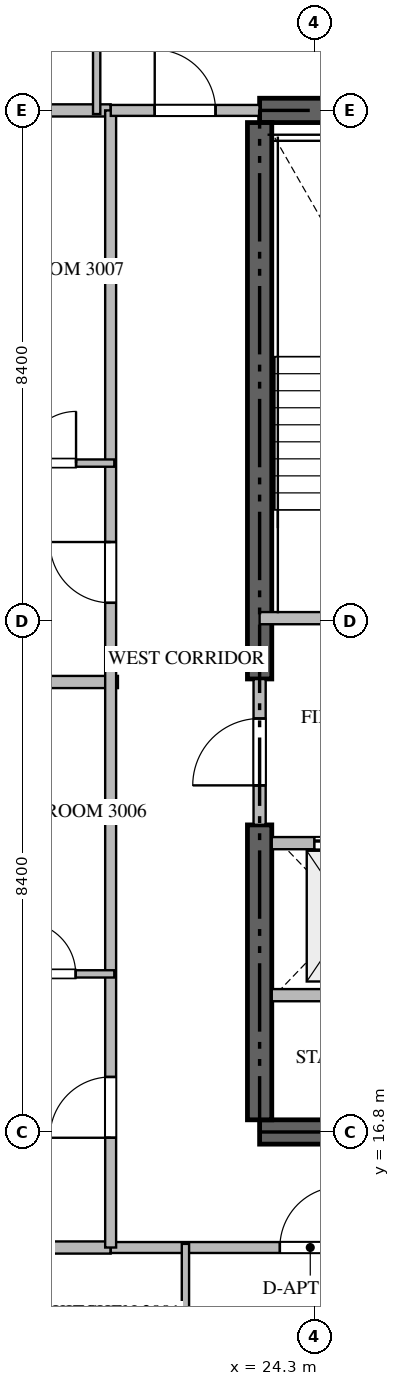
"""IFC4 building model, lengths in metres.
Left out: names, types, materials, properties, quantities, classifications, styles, units other than length and angle.
Written with IfcOpenShell. Run it as: python <this file> out.ifc"""

import sys

from ifc_helpers import new_model, si_unit, direction, frame, frame_2d, origin, place, context, subcontext, project, spatial, rectangle, extrude, source, transform, mapped, element, fill, save


model = new_model("IFC4")
c1 = context("Model", 3, precision=1e-05, world=origin(), true_north=direction((0.0, 1.0)))
c2 = subcontext(c1, "Body", "Model", "MODEL_VIEW")
j1 = project(units=[si_unit("LENGTHUNIT", "METRE"), si_unit("PLANEANGLEUNIT", "RADIAN")], contexts=[c1])
p1 = place(None, origin())
s1 = spatial("IfcSite", under=j1, at=p1, CompositionType="ELEMENT")
p2 = place(p1, origin())
s2 = spatial("IfcBuilding", under=s1, at=p2, CompositionType="ELEMENT")
p3 = place(p2, frame((0.0, 0.0, 123.9)))
s3 = spatial("IfcBuildingStorey", under=s2, at=p3, CompositionType="ELEMENT", Elevation=123.9)
for number, where, z_axis, x_axis in (
    (1, (23.4, 16.8, -0.26), (0.0, 0.0, 1.0), (1.0, 0.0, 0.0)),
    (2, (41.4, 33.6, -0.26), (0.0, 0.0, 1.0), (-1.0, 0.0, 0.0)),
):
    element("IfcWall", number, at=place(p3, frame(where, z_axis=z_axis, x_axis=x_axis)), inside=s3, PredefinedType="SHEAR", context=c2, shape_type="SweptSolid", body=[
        extrude(rectangle(XDim=18.0, YDim=0.4, at=frame_2d((9.0, 0.0))), origin(), (0.0, 0.0, 1.0), 3.748),
    ])
p4 = place(p3, frame((23.4, 17.0, -0.26), z_axis=(0.0, 0.0, 1.0), x_axis=(0.0, 1.0, 0.0)))
e3 = element("IfcWall", 3, at=p4, inside=s3, PredefinedType="SHEAR", context=c2, shape_type="SweptSolid", body=[
    extrude(rectangle(XDim=4.85, YDim=0.4, at=frame_2d((2.425, 0.0))), origin(), (0.0, 0.0, 1.0), 3.748),
])
p5 = place(p3, frame((23.4, 24.25, -0.26), z_axis=(0.0, 0.0, 1.0), x_axis=(0.0, 1.0, 0.0)))
e4 = element("IfcWall", 4, at=p5, inside=s3, PredefinedType="SHEAR", context=c2, shape_type="SweptSolid", body=[
    extrude(rectangle(XDim=9.15, YDim=0.4, at=frame_2d((4.575, 0.0))), origin(), (0.0, 0.0, 1.0), 3.748),
])
p6 = place(p3, frame((23.4, 25.25, 0.0), z_axis=(0.0, 0.0, 1.0), x_axis=(1.0, 0.0, 0.0)))
e5 = element("IfcWall", 5, at=p6, inside=s3, PredefinedType="STANDARD", context=c2, shape_type="SweptSolid", body=[
    extrude(rectangle(XDim=4.45, YDim=0.2, at=frame_2d((2.225, 0.0))), origin(), (0.0, 0.0, 1.0), 3.49),
])
p7 = place(p6, frame((1.65, 0.0, 0.0)))
e6 = element("IfcOpeningElement", 6, at=p7, cuts=e5, PredefinedType="OPENING", context=c2, shape_type="SweptSolid", body=[
    extrude(rectangle(XDim=1.1, YDim=2.15, at=frame_2d((0.55, 1.075))), frame((0.0, 0.11, 0.0), z_axis=(0.0, -1.0, 0.0), x_axis=(1.0, 0.0, 0.0)), (0.0, 0.0, 1.0), 0.22),
])
p8 = place(p3, frame((23.6, 21.55, 0.0), z_axis=(0.0, 0.0, 1.0), x_axis=(1.0, 0.0, 0.0)))
e7 = element("IfcWall", 7, at=p8, inside=s3, PredefinedType="STANDARD", context=c2, shape_type="SweptSolid", body=[
    extrude(rectangle(XDim=2.45, YDim=0.2, at=frame_2d((1.225, 0.0))), origin(), (0.0, 0.0, 1.0), 3.49),
])
p9 = place(p8, frame((0.7, 0.0, 0.0)))
e8 = element("IfcOpeningElement", 8, at=p9, cuts=e7, PredefinedType="OPENING", context=c2, shape_type="SweptSolid", body=[
    extrude(rectangle(XDim=1.2, YDim=2.2, at=frame_2d((0.6, 1.1))), frame((0.0, 0.11, 0.0), z_axis=(0.0, -1.0, 0.0), x_axis=(1.0, 0.0, 0.0)), (0.0, 0.0, 1.0), 0.22),
])
p10 = place(p3, frame((23.6, 19.05, 0.0), z_axis=(0.0, 0.0, 1.0), x_axis=(1.0, 0.0, 0.0)))
e9 = element("IfcWall", 9, at=p10, inside=s3, PredefinedType="STANDARD", context=c2, shape_type="SweptSolid", body=[
    extrude(rectangle(XDim=2.45, YDim=0.2, at=frame_2d((1.225, 0.0))), origin(), (0.0, 0.0, 1.0), 3.49),
])
p11 = place(p3, frame((23.4, 21.852, 0.0), z_axis=(0.0, 0.0, 1.0), x_axis=(0.0, 1.0, 0.0)))
e10 = element("IfcWall", 10, at=p11, inside=s3, PredefinedType="STANDARD", context=c2, shape_type="SweptSolid", body=[
    extrude(rectangle(XDim=2.396, YDim=0.2, at=frame_2d((1.198, 0.0))), origin(), (0.0, 0.0, 1.0), 3.49),
])
p12 = place(p11, frame((0.648, 0.0, 0.0)))
e11 = element("IfcOpeningElement", 11, at=p12, cuts=e10, PredefinedType="OPENING", context=c2, shape_type="SweptSolid", body=[
    extrude(rectangle(XDim=1.1, YDim=2.15, at=frame_2d((0.55, 1.075))), frame((0.0, 0.11, 0.0), z_axis=(0.0, -1.0, 0.0), x_axis=(1.0, 0.0, 0.0)), (0.0, 0.0, 1.0), 0.22),
])
p13 = place(p3, frame((7.882, 24.2, 0.0), z_axis=(0.0, 0.0, 1.0), x_axis=(1.0, 0.0, 0.0)))
e12 = element("IfcWall", 12, at=p13, inside=s3, PredefinedType="PARTITIONING", context=c2, shape_type="SweptSolid", body=[
    extrude(rectangle(XDim=13.188, YDim=0.2, at=frame_2d((6.594, 0.0))), origin(), (0.0, 0.0, 1.0), 3.49),
])
for number, where, z_axis, x_axis in (
    (13, (7.882, 14.9, 0.0), (0.0, 0.0, 1.0), (1.0, 0.0, 0.0)),
    (14, (7.882, 33.6, 0.0), (0.0, 0.0, 1.0), (1.0, 0.0, 0.0)),
):
    element("IfcWall", number, at=place(p3, frame(where, z_axis=z_axis, x_axis=x_axis)), inside=s3, PredefinedType="PARTITIONING", context=c2, shape_type="SweptSolid", body=[
        extrude(rectangle(XDim=13.068, YDim=0.2, at=frame_2d((6.534, 0.0))), origin(), (0.0, 0.0, 1.0), 3.49),
    ])
p14 = place(p3, frame((20.952, 14.9, 0.0), z_axis=(0.0, 0.0, 1.0), x_axis=(1.0, 0.0, 0.0)))
e15 = element("IfcWall", 15, at=p14, inside=s3, PredefinedType="PARTITIONING", context=c2, shape_type="SweptSolid", body=[
    extrude(rectangle(XDim=22.896, YDim=0.18, at=frame_2d((11.448, 0.0))), origin(), (0.0, 0.0, 1.0), 3.49),
])
p15 = place(p14, frame((2.781, 0.0, 0.0)))
e16 = element("IfcOpeningElement", 16, at=p15, cuts=e15, PredefinedType="OPENING", context=c2, shape_type="SweptSolid", body=[
    extrude(rectangle(XDim=1.0, YDim=2.15, at=frame_2d((0.5, 1.075))), frame((0.0, 0.1, 0.0), z_axis=(0.0, -1.0, 0.0), x_axis=(1.0, 0.0, 0.0)), (0.0, 0.0, 1.0), 0.2),
])
p16 = place(p14, frame((7.16, 0.0, 0.0)))
e17 = element("IfcOpeningElement", 17, at=p16, cuts=e15, PredefinedType="OPENING", context=c2, shape_type="SweptSolid", body=[
    extrude(rectangle(XDim=1.0, YDim=2.15, at=frame_2d((0.5, 1.075))), frame((0.0, 0.1, 0.0), z_axis=(0.0, -1.0, 0.0), x_axis=(1.0, 0.0, 0.0)), (0.0, 0.0, 1.0), 0.2),
])
p17 = place(p14, frame((19.115, 0.0, 0.0)))
e18 = element("IfcOpeningElement", 18, at=p17, cuts=e15, PredefinedType="OPENING", context=c2, shape_type="SweptSolid", body=[
    extrude(rectangle(XDim=1.0, YDim=2.15, at=frame_2d((0.5, 1.075))), frame((0.0, 0.1, 0.0), z_axis=(0.0, -1.0, 0.0), x_axis=(1.0, 0.0, 0.0)), (0.0, 0.0, 1.0), 0.2),
])
p18 = place(p3, frame((20.95, 14.9, 0.0), z_axis=(0.0, 0.0, 1.0), x_axis=(0.0, 1.0, 0.0)))
e19 = element("IfcWall", 19, at=p18, inside=s3, PredefinedType="PARTITIONING", context=c2, shape_type="SweptSolid", body=[
    extrude(rectangle(XDim=18.7, YDim=0.18, at=frame_2d((9.35, 0.0))), origin(), (0.0, 0.0, 1.0), 3.49),
])
p19 = place(p18, frame((1.805, 0.0, 0.0)))
e20 = element("IfcOpeningElement", 20, at=p19, cuts=e19, PredefinedType="OPENING", context=c2, shape_type="SweptSolid", body=[
    extrude(rectangle(XDim=1.0, YDim=2.15, at=frame_2d((0.5, 1.075))), frame((0.0, 0.1, 0.0), z_axis=(0.0, -1.0, 0.0), x_axis=(1.0, 0.0, 0.0)), (0.0, 0.0, 1.0), 0.2),
])
p20 = place(p18, frame((10.602, 0.0, 0.0)))
e21 = element("IfcOpeningElement", 21, at=p20, cuts=e19, PredefinedType="OPENING", context=c2, shape_type="SweptSolid", body=[
    extrude(rectangle(XDim=1.0, YDim=2.15, at=frame_2d((0.5, 1.075))), frame((0.0, 0.1, 0.0), z_axis=(0.0, -1.0, 0.0), x_axis=(1.0, 0.0, 0.0)), (0.0, 0.0, 1.0), 0.2),
])
p21 = place(p3, frame((20.952, 33.6, 0.0), z_axis=(0.0, 0.0, 1.0), x_axis=(1.0, 0.0, 0.0)))
e22 = element("IfcWall", 22, at=p21, inside=s3, PredefinedType="PARTITIONING", context=c2, shape_type="SweptSolid", body=[
    extrude(rectangle(XDim=2.446, YDim=0.18, at=frame_2d((1.223, 0.0))), origin(), (0.0, 0.0, 1.0), 3.49),
])
p22 = place(p21, frame((0.723, 0.0, 0.0)))
e23 = element("IfcOpeningElement", 23, at=p22, cuts=e22, PredefinedType="OPENING", context=c2, shape_type="SweptSolid", body=[
    extrude(rectangle(XDim=1.0, YDim=2.15, at=frame_2d((0.5, 1.075))), frame((0.0, 0.1, 0.0), z_axis=(0.0, -1.0, 0.0), x_axis=(1.0, 0.0, 0.0)), (0.0, 0.0, 1.0), 0.2),
])
for number, where, z_axis, x_axis in (
    (24, (22.18, 12.15, 0.0), (0.0, 0.0, 1.0), (0.0, 1.0, 0.0)),
    (25, (20.72, 36.35, 0.0), (0.0, 0.0, 1.0), (0.0, -1.0, 0.0)),
):
    element("IfcWall", number, at=place(p3, frame(where, z_axis=z_axis, x_axis=x_axis)), inside=s3, PredefinedType="PARTITIONING", context=c2, shape_type="SweptSolid", body=[
        extrude(rectangle(XDim=2.81, YDim=0.12, at=frame_2d((1.405, 0.0))), origin(), (0.0, 0.0, 1.0), 3.49),
    ])
p23 = place(p3, frame((18.889, 19.4, 0.0), z_axis=(0.0, 0.0, 1.0), x_axis=(1.0, 0.0, 0.0)))
e26 = element("IfcWall", 26, at=p23, inside=s3, PredefinedType="PARTITIONING", context=c2, shape_type="SweptSolid", body=[
    extrude(rectangle(XDim=2.121, YDim=0.12, at=frame_2d((1.061, 0.0))), origin(), (0.0, 0.0, 1.0), 3.49),
])
p24 = place(p23, frame((0.636, 0.0, 0.0)))
e27 = element("IfcOpeningElement", 27, at=p24, cuts=e26, PredefinedType="OPENING", context=c2, shape_type="SweptSolid", body=[
    extrude(rectangle(XDim=0.85, YDim=2.1, at=frame_2d((0.425, 1.05))), frame((0.0, 0.07, 0.0), z_axis=(0.0, -1.0, 0.0), x_axis=(1.0, 0.0, 0.0)), (0.0, 0.0, 1.0), 0.14),
])
p25 = place(p3, frame((18.902, 27.8, 0.0), z_axis=(0.0, 0.0, 1.0), x_axis=(1.0, 0.0, 0.0)))
e28 = element("IfcWall", 28, at=p25, inside=s3, PredefinedType="PARTITIONING", context=c2, shape_type="SweptSolid", body=[
    extrude(rectangle(XDim=2.108, YDim=0.12, at=frame_2d((1.054, 0.0))), origin(), (0.0, 0.0, 1.0), 3.49),
])
p26 = place(p25, frame((0.629, 0.0, 0.0)))
e29 = element("IfcOpeningElement", 29, at=p26, cuts=e28, PredefinedType="OPENING", context=c2, shape_type="SweptSolid", body=[
    extrude(rectangle(XDim=0.85, YDim=2.1, at=frame_2d((0.425, 1.05))), frame((0.0, 0.07, 0.0), z_axis=(0.0, -1.0, 0.0), x_axis=(1.0, 0.0, 0.0)), (0.0, 0.0, 1.0), 0.14),
])
m1 = source(origin(), c2, "Body", "SweptSolid", [
    extrude(rectangle(XDim=1.2, YDim=2.2, at=frame_2d((0.6, 1.1))), frame((0.0, 0.025, 0.0), z_axis=(0.0, -1.0, 0.0), x_axis=(1.0, 0.0, 0.0)), (0.0, 0.0, 1.0), 0.05),
])
p27 = place(p9, origin())
e30 = element("IfcDoor", 30, at=p27, inside=s3, OperationType="DOUBLE_DOOR_SLIDING", PredefinedType="DOOR", context=c2, shape_type="MappedRepresentation", body=[
    mapped(m1, transform((0.0, 0.0, 0.0), scale=1.0)),
])
fill(e8, e30)
m2 = source(origin(), c2, "Body", "SweptSolid", [
    extrude(rectangle(XDim=1.1, YDim=2.15, at=frame_2d((0.55, 1.075))), frame((0.0, 0.025, 0.0), z_axis=(0.0, -1.0, 0.0), x_axis=(1.0, 0.0, 0.0)), (0.0, 0.0, 1.0), 0.05),
])
p28 = place(p12, origin())
e31 = element("IfcDoor", 31, at=p28, inside=s3, OperationType="SINGLE_SWING_LEFT", PredefinedType="DOOR", context=c2, shape_type="MappedRepresentation", body=[
    mapped(m2, transform((0.0, 0.0, 0.0), scale=1.0)),
])
fill(e11, e31)
m3 = source(origin(), c2, "Body", "SweptSolid", [
    extrude(rectangle(XDim=1.0, YDim=2.15, at=frame_2d((0.5, 1.075))), frame((0.0, 0.025, 0.0), z_axis=(0.0, -1.0, 0.0), x_axis=(1.0, 0.0, 0.0)), (0.0, 0.0, 1.0), 0.05),
])
p29 = place(p15, origin())
e32 = element("IfcDoor", 32, at=p29, inside=s3, OperationType="SINGLE_SWING_RIGHT", PredefinedType="DOOR", context=c2, shape_type="MappedRepresentation", body=[
    mapped(m3, transform((0.0, 0.0, 0.0), scale=1.0)),
])
fill(e16, e32)
p30 = place(p19, origin())
e33 = element("IfcDoor", 33, at=p30, inside=s3, OperationType="SINGLE_SWING_LEFT", PredefinedType="DOOR", context=c2, shape_type="MappedRepresentation", body=[
    mapped(m3, transform((0.0, 0.0, 0.0), scale=1.0)),
])
fill(e20, e33)
p31 = place(p20, origin())
e34 = element("IfcDoor", 34, at=p31, inside=s3, OperationType="SINGLE_SWING_RIGHT", PredefinedType="DOOR", context=c2, shape_type="MappedRepresentation", body=[
    mapped(m3, transform((0.0, 0.0, 0.0), scale=1.0)),
])
fill(e21, e34)
p32 = place(p22, origin())
e35 = element("IfcDoor", 35, at=p32, inside=s3, OperationType="SINGLE_SWING_LEFT", PredefinedType="DOOR", context=c2, shape_type="MappedRepresentation", body=[
    mapped(m3, transform((0.0, 0.0, 0.0), scale=1.0)),
])
fill(e23, e35)
m4 = source(origin(), c2, "Body", "SweptSolid", [
    extrude(rectangle(XDim=0.85, YDim=2.1, at=frame_2d((0.425, 1.05))), frame((0.0, 0.025, 0.0), z_axis=(0.0, -1.0, 0.0), x_axis=(1.0, 0.0, 0.0)), (0.0, 0.0, 1.0), 0.05),
])
p33 = place(p24, origin())
e36 = element("IfcDoor", 36, at=p33, inside=s3, OperationType="SINGLE_SWING_LEFT", PredefinedType="DOOR", context=c2, shape_type="MappedRepresentation", body=[
    mapped(m4, transform((0.0, 0.0, 0.0), scale=1.0)),
])
fill(e27, e36)
p34 = place(p26, origin())
e37 = element("IfcDoor", 37, at=p34, inside=s3, OperationType="SINGLE_SWING_RIGHT", PredefinedType="DOOR", context=c2, shape_type="MappedRepresentation", body=[
    mapped(m4, transform((0.0, 0.0, 0.0), scale=1.0)),
])
fill(e29, e37)
save(model, sys.argv[1])
